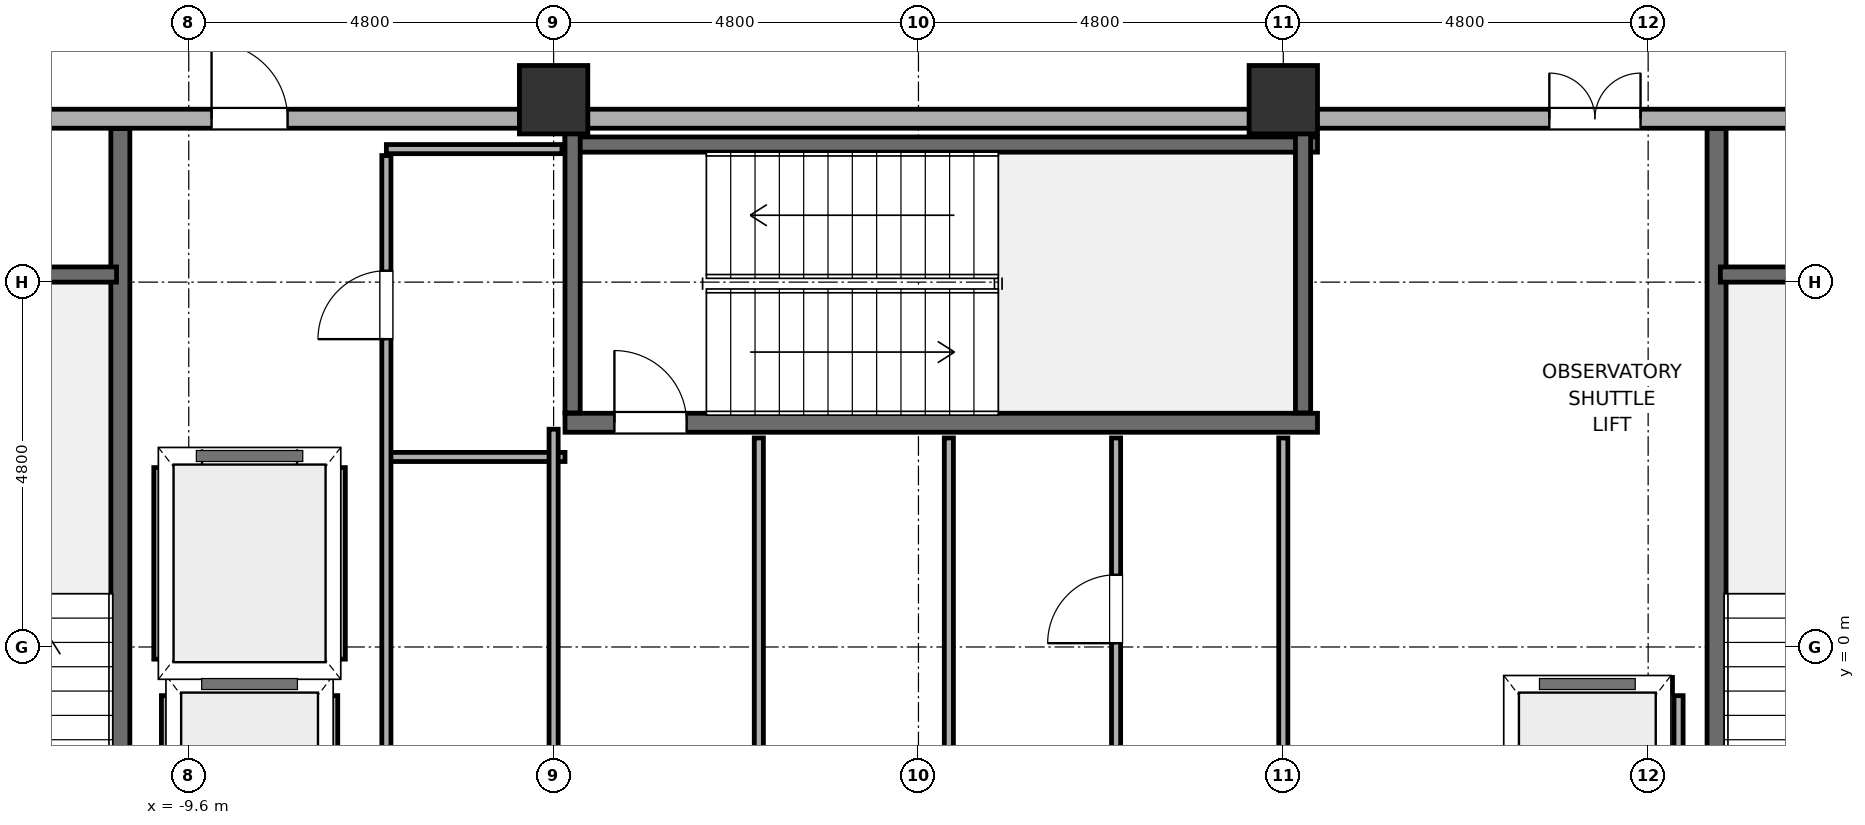
"""IFC4 building model, lengths in metres.
Left out: names, types, materials, properties, quantities, classifications, styles, units other than length and angle.
Written with IfcOpenShell. Run it as: python <this file> out.ifc"""

import sys

from ifc_helpers import new_model, si_unit, direction, frame, frame_2d, origin, origin_2d, place, context, subcontext, project, spatial, rectangle, hollow_rectangle, extrude, element, fill, save


model = new_model("IFC4")
c1 = context("Model", 3, precision=1e-05, world=origin(), true_north=direction((0.0, 1.0)))
c2 = subcontext(c1, "Body", "Model", "MODEL_VIEW")
j1 = project(units=[si_unit("LENGTHUNIT", "METRE"), si_unit("PLANEANGLEUNIT", "RADIAN")], contexts=[c1])
p1 = place(None, origin())
s1 = spatial("IfcSite", under=j1, at=p1, CompositionType="ELEMENT")
p2 = place(p1, origin())
s2 = spatial("IfcBuilding", under=s1, at=p2, CompositionType="ELEMENT")
p3 = place(p2, frame((0.0, 0.0, -10.2)))
s3 = spatial("IfcBuildingStorey", under=s2, at=p3, CompositionType="ELEMENT", Elevation=-10.2)
for number, where, z_axis, x_axis in (
    (1, (-4.8, 7.2, -0.25), (0.0, 0.0, 1.0), (1.0, 0.0, 0.0)),
    (2, (4.8, 7.2, -0.25), (0.0, 0.0, 1.0), (1.0, 0.0, 0.0)),
):
    element("IfcColumn", number, at=place(p3, frame(where, z_axis=z_axis, x_axis=x_axis)), inside=s3, PredefinedType="COLUMN", context=c2, shape_type="SweptSolid", body=[
        extrude(hollow_rectangle(XDim=0.9, YDim=0.9, WallThickness=0.04, at=origin_2d()), origin(), (0.0, 0.0, 1.0), 5.05),
    ])
p4 = place(p3, frame((-14.2, 6.95, 0.0), z_axis=(0.0, 0.0, 1.0), x_axis=(1.0, 0.0, 0.0)))
e3 = element("IfcWall", 3, at=p4, inside=s3, PredefinedType="SOLIDWALL", context=c2, shape_type="SweptSolid", body=[
    extrude(rectangle(XDim=9.4, YDim=0.25, at=frame_2d((4.7, 0.0))), origin(), (0.0, 0.0, 1.0), 3.55),
])
p5 = place(p4, frame((4.9, 0.0, 0.0)))
e4 = element("IfcOpeningElement", 4, at=p5, cuts=e3, PredefinedType="OPENING", context=c2, shape_type="SweptSolid", body=[
    extrude(rectangle(XDim=1.0, YDim=2.15, at=frame_2d((0.5, 1.075))), frame((0.0, 0.14, 0.0), z_axis=(0.0, -1.0, 0.0), x_axis=(1.0, 0.0, 0.0)), (0.0, 0.0, 1.0), 0.28),
])
p6 = place(p3, frame((-4.6, 6.95, 0.0), z_axis=(0.0, 0.0, 1.0), x_axis=(1.0, 0.0, 0.0)))
e5 = element("IfcWall", 5, at=p6, inside=s3, PredefinedType="SOLIDWALL", context=c2, shape_type="SweptSolid", body=[
    extrude(rectangle(XDim=9.2, YDim=0.25, at=frame_2d((4.6, 0.0))), origin(), (0.0, 0.0, 1.0), 3.55),
])
p7 = place(p3, frame((4.8, 6.95, 0.0), z_axis=(0.0, 0.0, 1.0), x_axis=(1.0, 0.0, 0.0)))
e6 = element("IfcWall", 6, at=p7, inside=s3, PredefinedType="SOLIDWALL", context=c2, shape_type="SweptSolid", body=[
    extrude(rectangle(XDim=9.4, YDim=0.25, at=frame_2d((4.7, 0.0))), origin(), (0.0, 0.0, 1.0), 3.55),
])
p8 = place(p7, frame((3.5, 0.0, 0.0)))
e7 = element("IfcOpeningElement", 7, at=p8, cuts=e6, PredefinedType="OPENING", context=c2, shape_type="SweptSolid", body=[
    extrude(rectangle(XDim=1.2, YDim=2.2, at=frame_2d((0.6, 1.1))), frame((0.0, 0.14, 0.0), z_axis=(0.0, -1.0, 0.0), x_axis=(1.0, 0.0, 0.0)), (0.0, 0.0, 1.0), 0.28),
])
p9 = place(p3, frame((-10.5, -6.82, -0.25), z_axis=(0.0, 0.0, 1.0), x_axis=(0.0, 1.0, 0.0)))
e8 = element("IfcWall", 8, at=p9, inside=s3, PredefinedType="SOLIDWALL", context=c2, shape_type="SweptSolid", body=[
    extrude(rectangle(XDim=13.64, YDim=0.25, at=frame_2d((6.82, 0.0))), origin(), (0.0, 0.0, 1.0), 4.8),
])
p10 = place(p9, frame((2.32, 0.0, 0.25)))
e9 = element("IfcOpeningElement", 9, at=p10, cuts=e8, PredefinedType="OPENING", context=c2, shape_type="SweptSolid", body=[
    extrude(rectangle(XDim=0.95, YDim=2.15, at=frame_2d((0.475, 1.075))), frame((0.0, 0.14, 0.0), z_axis=(0.0, -1.0, 0.0), x_axis=(1.0, 0.0, 0.0)), (0.0, 0.0, 1.0), 0.28),
])
p11 = place(p3, frame((-14.2, 4.9, -0.25), z_axis=(0.0, 0.0, 1.0), x_axis=(1.0, 0.0, 0.0)))
e10 = element("IfcWall", 10, at=p11, inside=s3, PredefinedType="SOLIDWALL", context=c2, shape_type="SweptSolid", body=[
    extrude(rectangle(XDim=3.65, YDim=0.2, at=frame_2d((1.825, 0.0))), origin(), (0.0, 0.0, 1.0), 4.8),
])
p12 = place(p3, frame((10.5, -6.82, -0.25), z_axis=(0.0, 0.0, 1.0), x_axis=(0.0, 1.0, 0.0)))
e11 = element("IfcWall", 11, at=p12, inside=s3, PredefinedType="SOLIDWALL", context=c2, shape_type="SweptSolid", body=[
    extrude(rectangle(XDim=13.64, YDim=0.25, at=frame_2d((6.82, 0.0))), origin(), (0.0, 0.0, 1.0), 4.8),
])
p13 = place(p12, frame((2.32, 0.0, 0.25)))
e12 = element("IfcOpeningElement", 12, at=p13, cuts=e11, PredefinedType="OPENING", context=c2, shape_type="SweptSolid", body=[
    extrude(rectangle(XDim=0.95, YDim=2.15, at=frame_2d((0.475, 1.075))), frame((0.0, 0.14, 0.0), z_axis=(0.0, -1.0, 0.0), x_axis=(1.0, 0.0, 0.0)), (0.0, 0.0, 1.0), 0.28),
])
p14 = place(p3, frame((10.55, 4.9, -0.25), z_axis=(0.0, 0.0, 1.0), x_axis=(1.0, 0.0, 0.0)))
e13 = element("IfcWall", 13, at=p14, inside=s3, PredefinedType="SOLIDWALL", context=c2, shape_type="SweptSolid", body=[
    extrude(rectangle(XDim=3.65, YDim=0.2, at=frame_2d((1.825, 0.0))), origin(), (0.0, 0.0, 1.0), 4.8),
])
p15 = place(p3, frame((-4.65, 2.95, -0.25), z_axis=(0.0, 0.0, 1.0), x_axis=(1.0, 0.0, 0.0)))
e14 = element("IfcWall", 14, at=p15, inside=s3, PredefinedType="SOLIDWALL", context=c2, shape_type="SweptSolid", body=[
    extrude(rectangle(XDim=9.9, YDim=0.25, at=frame_2d((4.95, 0.0))), origin(), (0.0, 0.0, 1.0), 4.8),
])
p16 = place(p15, frame((0.65, 0.0, 0.25)))
e15 = element("IfcOpeningElement", 15, at=p16, cuts=e14, PredefinedType="OPENING", context=c2, shape_type="SweptSolid", body=[
    extrude(rectangle(XDim=0.95, YDim=2.15, at=frame_2d((0.475, 1.075))), frame((0.0, 0.14, 0.0), z_axis=(0.0, -1.0, 0.0), x_axis=(1.0, 0.0, 0.0)), (0.0, 0.0, 1.0), 0.28),
])
p17 = place(p3, frame((-4.65, 6.61, -0.25), z_axis=(0.0, 0.0, 1.0), x_axis=(1.0, 0.0, 0.0)))
e16 = element("IfcWall", 16, at=p17, inside=s3, PredefinedType="SOLIDWALL", context=c2, shape_type="SweptSolid", body=[
    extrude(rectangle(XDim=9.9, YDim=0.2, at=frame_2d((4.95, 0.0))), origin(), (0.0, 0.0, 1.0), 4.8),
])
for number, where, z_axis, x_axis in (
    (17, (-4.55, 3.08, -0.25), (0.0, 0.0, 1.0), (0.0, 1.0, 0.0)),
    (18, (5.06, 3.08, -0.25), (0.0, 0.0, 1.0), (0.0, 1.0, 0.0)),
):
    element("IfcWall", number, at=place(p3, frame(where, z_axis=z_axis, x_axis=x_axis)), inside=s3, PredefinedType="SOLIDWALL", context=c2, shape_type="SweptSolid", body=[
        extrude(rectangle(XDim=3.74, YDim=0.2, at=frame_2d((1.87, 0.0))), origin(), (0.0, 0.0, 1.0), 4.8),
    ])
p18 = place(p3, frame((-9.82, -0.5, 0.0), z_axis=(0.0, 0.0, 1.0), x_axis=(1.0, 0.0, 0.0)))
e19 = element("IfcWall", 19, at=p18, inside=s3, PredefinedType="SOLIDWALL", context=c2, shape_type="SweptSolid", body=[
    extrude(rectangle(XDim=2.04, YDim=0.2, at=frame_2d((1.02, 0.0))), origin(), (0.0, 0.0, 1.0), 4.55),
])
for number, where, z_axis, x_axis in (
    (20, (-9.9, -2.96, 0.0), (0.0, 0.0, 1.0), (0.0, 1.0, 0.0)),
    (21, (-7.7, -2.96, 0.0), (0.0, 0.0, 1.0), (0.0, 1.0, 0.0)),
):
    element("IfcWall", number, at=place(p3, frame(where, z_axis=z_axis, x_axis=x_axis)), inside=s3, PredefinedType="PARTITIONING", context=c2, shape_type="SweptSolid", body=[
        extrude(rectangle(XDim=2.32, YDim=0.12, at=frame_2d((1.16, 0.0))), origin(), (0.0, 0.0, 1.0), 4.55),
    ])
p19 = place(p3, frame((7.88, -0.5, 0.0), z_axis=(0.0, 0.0, 1.0), x_axis=(1.0, 0.0, 0.0)))
e22 = element("IfcWall", 22, at=p19, inside=s3, PredefinedType="SOLIDWALL", context=c2, shape_type="SweptSolid", body=[
    extrude(rectangle(XDim=2.04, YDim=0.2, at=frame_2d((1.02, 0.0))), origin(), (0.0, 0.0, 1.0), 4.55),
])
for number, where, z_axis, x_axis in (
    (23, (7.8, -2.96, 0.0), (0.0, 0.0, 1.0), (0.0, 1.0, 0.0)),
    (24, (10.0, -2.96, 0.0), (0.0, 0.0, 1.0), (0.0, 1.0, 0.0)),
):
    element("IfcWall", number, at=place(p3, frame(where, z_axis=z_axis, x_axis=x_axis)), inside=s3, PredefinedType="PARTITIONING", context=c2, shape_type="SweptSolid", body=[
        extrude(rectangle(XDim=2.32, YDim=0.12, at=frame_2d((1.16, 0.0))), origin(), (0.0, 0.0, 1.0), 4.55),
    ])
p20 = place(p3, frame((-9.92, 2.5, 0.0), z_axis=(0.0, 0.0, 1.0), x_axis=(1.0, 0.0, 0.0)))
e25 = element("IfcWall", 25, at=p20, inside=s3, PredefinedType="SOLIDWALL", context=c2, shape_type="SweptSolid", body=[
    extrude(rectangle(XDim=2.24, YDim=0.2, at=frame_2d((1.12, 0.0))), origin(), (0.0, 0.0, 1.0), 4.55),
])
p21 = place(p20, frame((0.495, 0.0, 0.0)))
e26 = element("IfcOpeningElement", 26, at=p21, cuts=e25, PredefinedType="OPENING", context=c2, shape_type="SweptSolid", body=[
    extrude(rectangle(XDim=1.25, YDim=2.25, at=frame_2d((0.625, 1.125))), frame((0.0, 0.115, 0.0), z_axis=(0.0, -1.0, 0.0), x_axis=(1.0, 0.0, 0.0)), (0.0, 0.0, 1.0), 0.23),
])
p22 = place(p3, frame((-9.92, -0.3, 0.0), z_axis=(0.0, 0.0, 1.0), x_axis=(1.0, 0.0, 0.0)))
e27 = element("IfcWall", 27, at=p22, inside=s3, PredefinedType="SOLIDWALL", context=c2, shape_type="SweptSolid", body=[
    extrude(rectangle(XDim=2.24, YDim=0.2, at=frame_2d((1.12, 0.0))), origin(), (0.0, 0.0, 1.0), 4.55),
])
for number, where, z_axis, x_axis in (
    (28, (-10.0, -0.16, 0.0), (0.0, 0.0, 1.0), (0.0, 1.0, 0.0)),
    (29, (-7.6, -0.16, 0.0), (0.0, 0.0, 1.0), (0.0, 1.0, 0.0)),
):
    element("IfcWall", number, at=place(p3, frame(where, z_axis=z_axis, x_axis=x_axis)), inside=s3, PredefinedType="PARTITIONING", context=c2, shape_type="SweptSolid", body=[
        extrude(rectangle(XDim=2.52, YDim=0.12, at=frame_2d((1.26, 0.0))), origin(), (0.0, 0.0, 1.0), 4.55),
    ])
p23 = place(p3, frame((-7.0, 2.5, 0.0), z_axis=(0.0, 0.0, 1.0), x_axis=(1.0, 0.0, 0.0)))
e30 = element("IfcWall", 30, at=p23, inside=s3, PredefinedType="PARTITIONING", context=c2, shape_type="SweptSolid", body=[
    extrude(rectangle(XDim=2.35, YDim=0.12, at=frame_2d((1.175, 0.0))), origin(), (0.0, 0.0, 1.0), 4.55),
])
p24 = place(p3, frame((-7.0, 6.55, 0.0), z_axis=(0.0, 0.0, 1.0), x_axis=(1.0, 0.0, 0.0)))
e31 = element("IfcWall", 31, at=p24, inside=s3, PredefinedType="PARTITIONING", context=c2, shape_type="SweptSolid", body=[
    extrude(rectangle(XDim=2.31, YDim=0.12, at=frame_2d((1.155, 0.0))), origin(), (0.0, 0.0, 1.0), 4.55),
])
p25 = place(p3, frame((-7.0, -3.11, 0.0), z_axis=(0.0, 0.0, 1.0), x_axis=(0.0, 1.0, 0.0)))
e32 = element("IfcWall", 32, at=p25, inside=s3, PredefinedType="PARTITIONING", context=c2, shape_type="SweptSolid", body=[
    extrude(rectangle(XDim=9.575, YDim=0.12, at=frame_2d((4.788, 0.0))), origin(), (0.0, 0.0, 1.0), 4.55),
])
p26 = place(p25, frame((7.16, 0.0, 0.0)))
e33 = element("IfcOpeningElement", 33, at=p26, cuts=e32, PredefinedType="OPENING", context=c2, shape_type="SweptSolid", body=[
    extrude(rectangle(XDim=0.9, YDim=2.1, at=frame_2d((0.45, 1.05))), frame((0.0, 0.075, 0.0), z_axis=(0.0, -1.0, 0.0), x_axis=(1.0, 0.0, 0.0)), (0.0, 0.0, 1.0), 0.15),
])
p27 = place(p3, frame((-4.8, -6.415, 0.0), z_axis=(0.0, 0.0, 1.0), x_axis=(0.0, 1.0, 0.0)))
e34 = element("IfcWall", 34, at=p27, inside=s3, PredefinedType="PARTITIONING", context=c2, shape_type="SweptSolid", body=[
    extrude(rectangle(XDim=9.28, YDim=0.12, at=frame_2d((4.64, 0.0))), origin(), (0.0, 0.0, 1.0), 4.55),
])
p28 = place(p27, frame((3.965, 0.0, 0.0)))
e35 = element("IfcOpeningElement", 35, at=p28, cuts=e34, PredefinedType="OPENING", context=c2, shape_type="SweptSolid", body=[
    extrude(rectangle(XDim=0.9, YDim=2.1, at=frame_2d((0.45, 1.05))), frame((0.0, 0.075, 0.0), z_axis=(0.0, -1.0, 0.0), x_axis=(1.0, 0.0, 0.0)), (0.0, 0.0, 1.0), 0.15),
])
p29 = place(p3, frame((-2.1, -6.415, 0.0), z_axis=(0.0, 0.0, 1.0), x_axis=(0.0, 1.0, 0.0)))
e36 = element("IfcWall", 36, at=p29, inside=s3, PredefinedType="PARTITIONING", context=c2, shape_type="SweptSolid", body=[
    extrude(rectangle(XDim=9.165, YDim=0.12, at=frame_2d((4.583, 0.0))), origin(), (0.0, 0.0, 1.0), 4.55),
])
p30 = place(p29, frame((3.965, 0.0, 0.0)))
e37 = element("IfcOpeningElement", 37, at=p30, cuts=e36, PredefinedType="OPENING", context=c2, shape_type="SweptSolid", body=[
    extrude(rectangle(XDim=0.9, YDim=2.1, at=frame_2d((0.45, 1.05))), frame((0.0, 0.075, 0.0), z_axis=(0.0, -1.0, 0.0), x_axis=(1.0, 0.0, 0.0)), (0.0, 0.0, 1.0), 0.15),
])
p31 = place(p3, frame((0.4, -6.415, 0.0), z_axis=(0.0, 0.0, 1.0), x_axis=(0.0, 1.0, 0.0)))
e38 = element("IfcWall", 38, at=p31, inside=s3, PredefinedType="PARTITIONING", context=c2, shape_type="SweptSolid", body=[
    extrude(rectangle(XDim=9.165, YDim=0.12, at=frame_2d((4.583, 0.0))), origin(), (0.0, 0.0, 1.0), 4.55),
])
p32 = place(p3, frame((2.6, -6.415, 0.0), z_axis=(0.0, 0.0, 1.0), x_axis=(0.0, 1.0, 0.0)))
e39 = element("IfcWall", 39, at=p32, inside=s3, PredefinedType="PARTITIONING", context=c2, shape_type="SweptSolid", body=[
    extrude(rectangle(XDim=9.165, YDim=0.12, at=frame_2d((4.583, 0.0))), origin(), (0.0, 0.0, 1.0), 4.55),
])
p33 = place(p32, frame((1.465, 0.0, 0.0)))
e40 = element("IfcOpeningElement", 40, at=p33, cuts=e39, PredefinedType="OPENING", context=c2, shape_type="SweptSolid", body=[
    extrude(rectangle(XDim=0.9, YDim=2.1, at=frame_2d((0.45, 1.05))), frame((0.0, 0.075, 0.0), z_axis=(0.0, -1.0, 0.0), x_axis=(1.0, 0.0, 0.0)), (0.0, 0.0, 1.0), 0.15),
])
p34 = place(p32, frame((6.465, 0.0, 0.0)))
e41 = element("IfcOpeningElement", 41, at=p34, cuts=e39, PredefinedType="OPENING", context=c2, shape_type="SweptSolid", body=[
    extrude(rectangle(XDim=0.9, YDim=2.1, at=frame_2d((0.45, 1.05))), frame((0.0, 0.075, 0.0), z_axis=(0.0, -1.0, 0.0), x_axis=(1.0, 0.0, 0.0)), (0.0, 0.0, 1.0), 0.15),
])
p35 = place(p3, frame((4.8, -6.415, 0.0), z_axis=(0.0, 0.0, 1.0), x_axis=(0.0, 1.0, 0.0)))
e42 = element("IfcWall", 42, at=p35, inside=s3, PredefinedType="PARTITIONING", context=c2, shape_type="SweptSolid", body=[
    extrude(rectangle(XDim=9.165, YDim=0.12, at=frame_2d((4.583, 0.0))), origin(), (0.0, 0.0, 1.0), 4.55),
])
p36 = place(p5, origin())
e43 = element("IfcDoor", 43, at=p36, inside=s3, OperationType="SINGLE_SWING_RIGHT", PredefinedType="DOOR", context=c2, shape_type="SweptSolid", body=[
    extrude(rectangle(XDim=1.0, YDim=2.15, at=frame_2d((0.5, 1.075))), frame((0.0, 0.025, 0.0), z_axis=(0.0, -1.0, 0.0), x_axis=(1.0, 0.0, 0.0)), (0.0, 0.0, 1.0), 0.05),
])
fill(e4, e43)
p37 = place(p8, origin())
e44 = element("IfcDoor", 44, at=p37, inside=s3, OperationType="DOUBLE_DOOR_SINGLE_SWING", PredefinedType="DOOR", context=c2, shape_type="SweptSolid", body=[
    extrude(rectangle(XDim=1.2, YDim=2.2, at=frame_2d((0.6, 1.1))), frame((0.0, 0.025, 0.0), z_axis=(0.0, -1.0, 0.0), x_axis=(1.0, 0.0, 0.0)), (0.0, 0.0, 1.0), 0.05),
])
fill(e7, e44)
p38 = place(p16, origin())
e45 = element("IfcDoor", 45, at=p38, inside=s3, OperationType="SINGLE_SWING_RIGHT", PredefinedType="DOOR", context=c2, shape_type="SweptSolid", body=[
    extrude(rectangle(XDim=0.95, YDim=2.15, at=frame_2d((0.475, 1.075))), frame((0.0, 0.025, 0.0), z_axis=(0.0, -1.0, 0.0), x_axis=(1.0, 0.0, 0.0)), (0.0, 0.0, 1.0), 0.05),
])
fill(e15, e45)
p39 = place(p21, origin())
e46 = element("IfcDoor", 46, at=p39, inside=s3, OperationType="SLIDING_TO_LEFT", PredefinedType="DOOR", context=c2, shape_type="SweptSolid", body=[
    extrude(rectangle(XDim=1.25, YDim=2.25, at=frame_2d((0.625, 1.125))), frame((0.0, 0.025, 0.0), z_axis=(0.0, -1.0, 0.0), x_axis=(1.0, 0.0, 0.0)), (0.0, 0.0, 1.0), 0.05),
])
fill(e26, e46)
p40 = place(p26, origin())
e47 = element("IfcDoor", 47, at=p40, inside=s3, OperationType="SINGLE_SWING_LEFT", PredefinedType="DOOR", context=c2, shape_type="SweptSolid", body=[
    extrude(rectangle(XDim=0.9, YDim=2.1, at=frame_2d((0.45, 1.05))), frame((0.0, 0.025, 0.0), z_axis=(0.0, -1.0, 0.0), x_axis=(1.0, 0.0, 0.0)), (0.0, 0.0, 1.0), 0.05),
])
fill(e33, e47)
p41 = place(p34, origin())
e48 = element("IfcDoor", 48, at=p41, inside=s3, OperationType="SINGLE_SWING_RIGHT", PredefinedType="DOOR", context=c2, shape_type="SweptSolid", body=[
    extrude(rectangle(XDim=0.9, YDim=2.1, at=frame_2d((0.45, 1.05))), frame((0.0, 0.025, 0.0), z_axis=(0.0, -1.0, 0.0), x_axis=(1.0, 0.0, 0.0)), (0.0, 0.0, 1.0), 0.05),
])
fill(e41, e48)
save(model, sys.argv[1])
